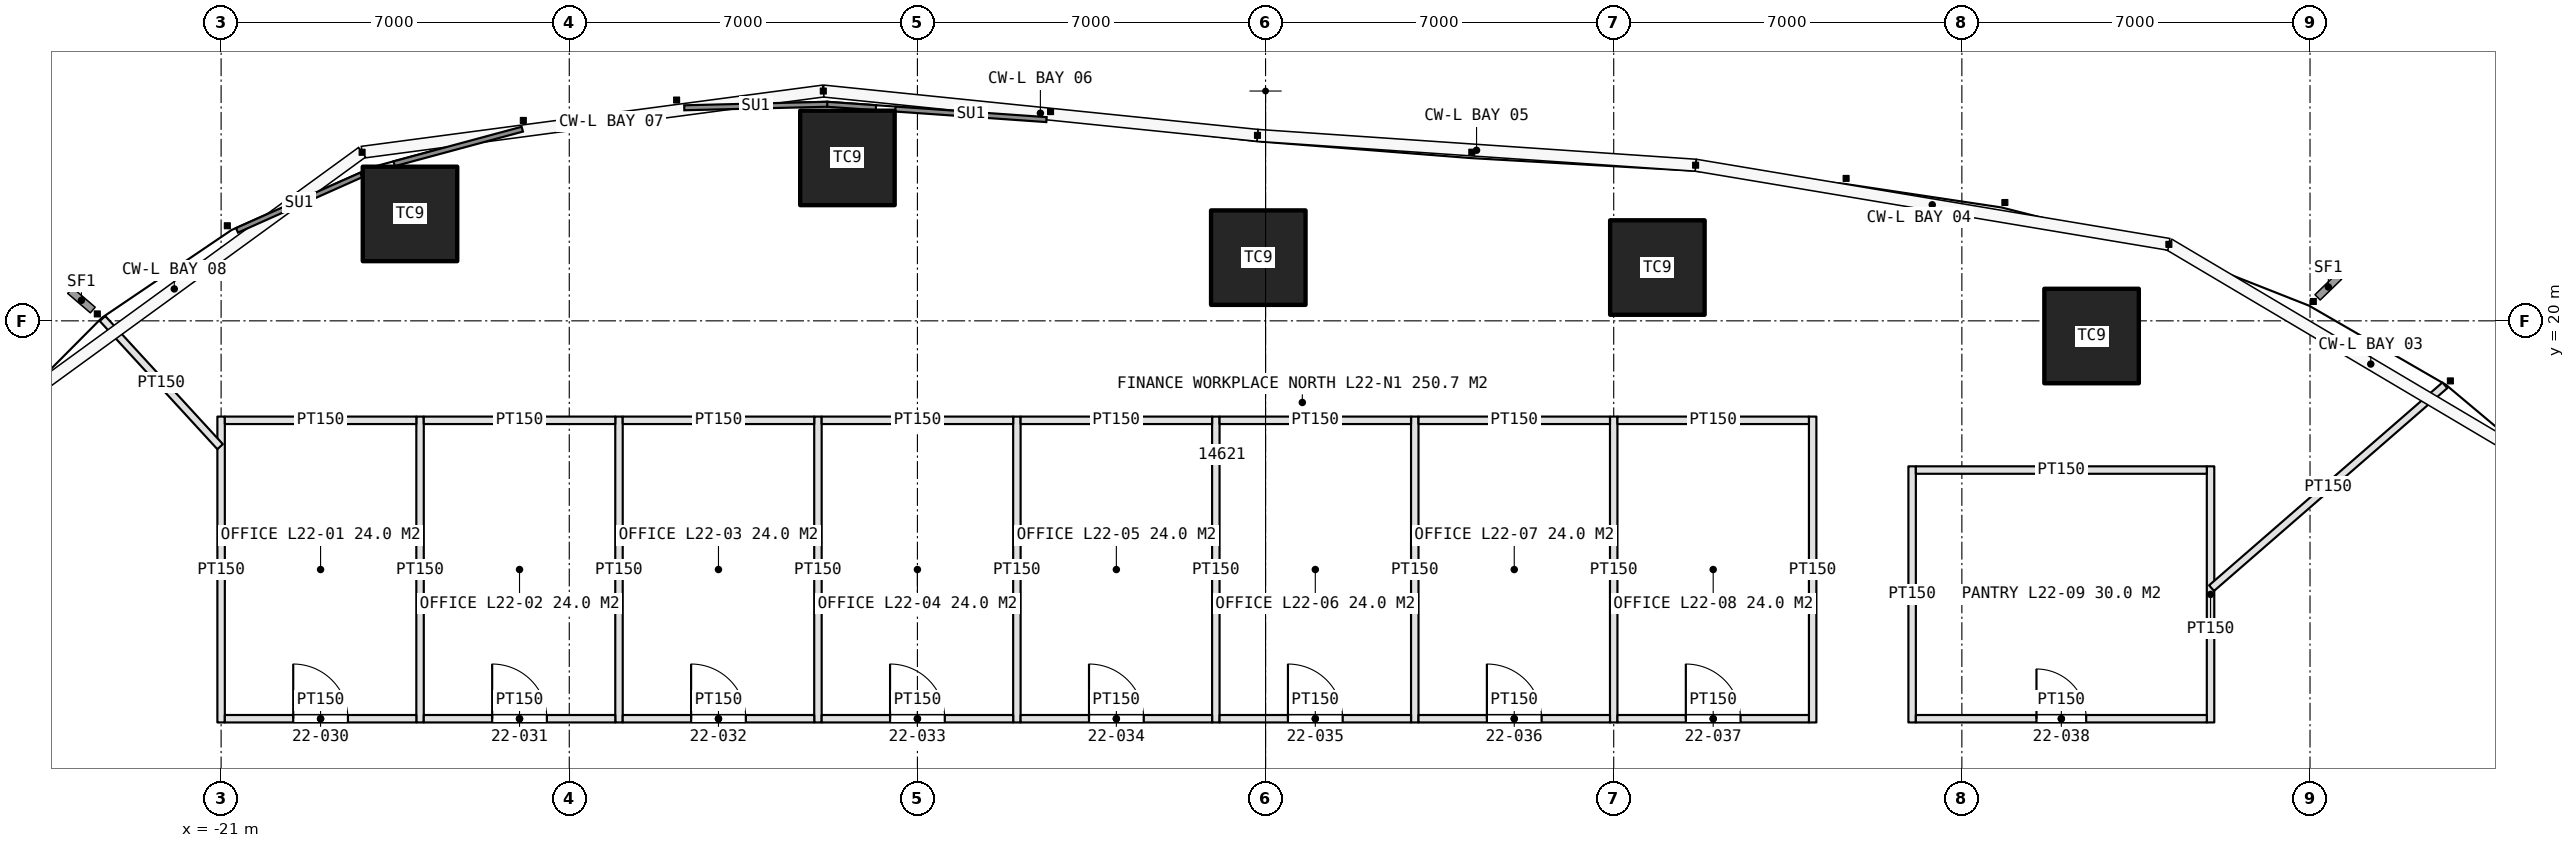
"""IFC4 building model, lengths in metres.
Left out: names, types, materials, properties, quantities, classifications, styles, units other than length and angle.
Written with IfcOpenShell. Run it as: python <this file> out.ifc"""

import sys

from ifc_helpers import new_model, si_unit, direction, frame, frame_2d, origin, origin_2d, place, context, subcontext, project, spatial, rectangle, extrude, element, fill, save


model = new_model("IFC4")
c1 = context("Model", 3, precision=1e-05, world=origin(), true_north=direction((0.0, 1.0)))
c2 = subcontext(c1, "Body", "Model", "MODEL_VIEW")
j1 = project(units=[si_unit("LENGTHUNIT", "METRE"), si_unit("PLANEANGLEUNIT", "RADIAN")], contexts=[c1])
p1 = place(None, origin())
s1 = spatial("IfcSite", under=j1, at=p1, CompositionType="ELEMENT")
p2 = place(p1, origin())
s2 = spatial("IfcBuilding", under=s1, at=p2, CompositionType="ELEMENT")
p3 = place(p2, frame((0.0, 0.0, 109.2)))
s3 = spatial("IfcBuildingStorey", under=s2, at=p3, CompositionType="ELEMENT", Elevation=109.2)
for number, where, z_axis, x_axis in (
    (1, (16.608, 19.695, 0.0), (0.0, 0.0, 1.0), (1.0, 0.0, 0.0)),
    (2, (7.878, 21.072, 0.0), (0.0, 0.0, 1.0), (1.0, 0.0, 0.0)),
    (3, (-0.146, 21.271, 0.0), (0.0, 0.0, 1.0), (1.0, 0.0, 0.0)),
    (4, (-8.407, 23.276, 0.0), (0.0, 0.0, 1.0), (1.0, 0.0, 0.0)),
    (5, (-17.202, 22.15, 0.0), (0.0, 0.0, 1.0), (1.0, 0.0, 0.0)),
):
    element("IfcColumn", number, at=place(p3, frame(where, z_axis=z_axis, x_axis=x_axis)), inside=s3, PredefinedType="COLUMN", context=c2, shape_type="SweptSolid", body=[
        extrude(rectangle(XDim=1.9, YDim=1.9, at=origin_2d()), origin(), (0.0, 0.0, 1.0), 4.2),
    ])
for number, where, z_axis, x_axis in (
    (6, (-21.0, 11.925, 0.0), (0.0, 0.0, 1.0), (0.0, 1.0, 0.0)),
    (7, (-17.0, 11.925, 0.0), (0.0, 0.0, 1.0), (0.0, 1.0, 0.0)),
    (8, (-13.0, 11.925, 0.0), (0.0, 0.0, 1.0), (0.0, 1.0, 0.0)),
    (9, (-9.0, 11.925, 0.0), (0.0, 0.0, 1.0), (0.0, 1.0, 0.0)),
    (10, (-5.0, 11.925, 0.0), (0.0, 0.0, 1.0), (0.0, 1.0, 0.0)),
    (11, (-1.0, 11.925, 0.0), (0.0, 0.0, 1.0), (0.0, 1.0, 0.0)),
    (12, (3.0, 11.925, 0.0), (0.0, 0.0, 1.0), (0.0, 1.0, 0.0)),
    (13, (7.0, 11.925, 0.0), (0.0, 0.0, 1.0), (0.0, 1.0, 0.0)),
    (14, (11.0, 11.925, 0.0), (0.0, 0.0, 1.0), (0.0, 1.0, 0.0)),
):
    element("IfcWall", number, at=place(p3, frame(where, z_axis=z_axis, x_axis=x_axis)), inside=s3, PredefinedType="PARTITIONING", context=c2, shape_type="SweptSolid", body=[
        extrude(rectangle(XDim=6.15, YDim=0.15, at=frame_2d((3.075, 0.0))), origin(), (0.0, 0.0, 1.0), 3.0),
    ])
p4 = place(p3, frame((-20.925, 12.0, 0.0), z_axis=(0.0, 0.0, 1.0), x_axis=(1.0, 0.0, 0.0)))
e15 = element("IfcWall", 15, at=p4, inside=s3, PredefinedType="PARTITIONING", context=c2, shape_type="SweptSolid", body=[
    extrude(rectangle(XDim=3.85, YDim=0.15, at=frame_2d((1.925, 0.0))), origin(), (0.0, 0.0, 1.0), 3.0),
])
p5 = place(p4, frame((1.375, 0.0, 0.0)))
e16 = element("IfcOpeningElement", 16, at=p5, cuts=e15, PredefinedType="OPENING", context=c2, shape_type="SweptSolid", body=[
    extrude(rectangle(XDim=1.1, YDim=2.3, at=frame_2d((0.55, 1.15))), frame((0.0, 0.085, 0.0), z_axis=(0.0, -1.0, 0.0), x_axis=(1.0, 0.0, 0.0)), (0.0, 0.0, 1.0), 0.17),
])
p6 = place(p3, frame((-20.925, 18.0, 0.0), z_axis=(0.0, 0.0, 1.0), x_axis=(1.0, 0.0, 0.0)))
e17 = element("IfcWall", 17, at=p6, inside=s3, PredefinedType="PARTITIONING", context=c2, shape_type="SweptSolid", body=[
    extrude(rectangle(XDim=3.85, YDim=0.15, at=frame_2d((1.925, 0.0))), origin(), (0.0, 0.0, 1.0), 3.0),
])
p7 = place(p3, frame((-16.925, 12.0, 0.0), z_axis=(0.0, 0.0, 1.0), x_axis=(1.0, 0.0, 0.0)))
e18 = element("IfcWall", 18, at=p7, inside=s3, PredefinedType="PARTITIONING", context=c2, shape_type="SweptSolid", body=[
    extrude(rectangle(XDim=3.85, YDim=0.15, at=frame_2d((1.925, 0.0))), origin(), (0.0, 0.0, 1.0), 3.0),
])
p8 = place(p7, frame((1.375, 0.0, 0.0)))
e19 = element("IfcOpeningElement", 19, at=p8, cuts=e18, PredefinedType="OPENING", context=c2, shape_type="SweptSolid", body=[
    extrude(rectangle(XDim=1.1, YDim=2.3, at=frame_2d((0.55, 1.15))), frame((0.0, 0.085, 0.0), z_axis=(0.0, -1.0, 0.0), x_axis=(1.0, 0.0, 0.0)), (0.0, 0.0, 1.0), 0.17),
])
p9 = place(p3, frame((-16.925, 18.0, 0.0), z_axis=(0.0, 0.0, 1.0), x_axis=(1.0, 0.0, 0.0)))
e20 = element("IfcWall", 20, at=p9, inside=s3, PredefinedType="PARTITIONING", context=c2, shape_type="SweptSolid", body=[
    extrude(rectangle(XDim=3.85, YDim=0.15, at=frame_2d((1.925, 0.0))), origin(), (0.0, 0.0, 1.0), 3.0),
])
p10 = place(p3, frame((-12.925, 12.0, 0.0), z_axis=(0.0, 0.0, 1.0), x_axis=(1.0, 0.0, 0.0)))
e21 = element("IfcWall", 21, at=p10, inside=s3, PredefinedType="PARTITIONING", context=c2, shape_type="SweptSolid", body=[
    extrude(rectangle(XDim=3.85, YDim=0.15, at=frame_2d((1.925, 0.0))), origin(), (0.0, 0.0, 1.0), 3.0),
])
p11 = place(p10, frame((1.375, 0.0, 0.0)))
e22 = element("IfcOpeningElement", 22, at=p11, cuts=e21, PredefinedType="OPENING", context=c2, shape_type="SweptSolid", body=[
    extrude(rectangle(XDim=1.1, YDim=2.3, at=frame_2d((0.55, 1.15))), frame((0.0, 0.085, 0.0), z_axis=(0.0, -1.0, 0.0), x_axis=(1.0, 0.0, 0.0)), (0.0, 0.0, 1.0), 0.17),
])
p12 = place(p3, frame((-12.925, 18.0, 0.0), z_axis=(0.0, 0.0, 1.0), x_axis=(1.0, 0.0, 0.0)))
e23 = element("IfcWall", 23, at=p12, inside=s3, PredefinedType="PARTITIONING", context=c2, shape_type="SweptSolid", body=[
    extrude(rectangle(XDim=3.85, YDim=0.15, at=frame_2d((1.925, 0.0))), origin(), (0.0, 0.0, 1.0), 3.0),
])
p13 = place(p3, frame((-8.925, 12.0, 0.0), z_axis=(0.0, 0.0, 1.0), x_axis=(1.0, 0.0, 0.0)))
e24 = element("IfcWall", 24, at=p13, inside=s3, PredefinedType="PARTITIONING", context=c2, shape_type="SweptSolid", body=[
    extrude(rectangle(XDim=3.85, YDim=0.15, at=frame_2d((1.925, 0.0))), origin(), (0.0, 0.0, 1.0), 3.0),
])
p14 = place(p13, frame((1.375, 0.0, 0.0)))
e25 = element("IfcOpeningElement", 25, at=p14, cuts=e24, PredefinedType="OPENING", context=c2, shape_type="SweptSolid", body=[
    extrude(rectangle(XDim=1.1, YDim=2.3, at=frame_2d((0.55, 1.15))), frame((0.0, 0.085, 0.0), z_axis=(0.0, -1.0, 0.0), x_axis=(1.0, 0.0, 0.0)), (0.0, 0.0, 1.0), 0.17),
])
p15 = place(p3, frame((-8.925, 18.0, 0.0), z_axis=(0.0, 0.0, 1.0), x_axis=(1.0, 0.0, 0.0)))
e26 = element("IfcWall", 26, at=p15, inside=s3, PredefinedType="PARTITIONING", context=c2, shape_type="SweptSolid", body=[
    extrude(rectangle(XDim=3.85, YDim=0.15, at=frame_2d((1.925, 0.0))), origin(), (0.0, 0.0, 1.0), 3.0),
])
p16 = place(p3, frame((-4.925, 12.0, 0.0), z_axis=(0.0, 0.0, 1.0), x_axis=(1.0, 0.0, 0.0)))
e27 = element("IfcWall", 27, at=p16, inside=s3, PredefinedType="PARTITIONING", context=c2, shape_type="SweptSolid", body=[
    extrude(rectangle(XDim=3.85, YDim=0.15, at=frame_2d((1.925, 0.0))), origin(), (0.0, 0.0, 1.0), 3.0),
])
p17 = place(p16, frame((1.375, 0.0, 0.0)))
e28 = element("IfcOpeningElement", 28, at=p17, cuts=e27, PredefinedType="OPENING", context=c2, shape_type="SweptSolid", body=[
    extrude(rectangle(XDim=1.1, YDim=2.3, at=frame_2d((0.55, 1.15))), frame((0.0, 0.085, 0.0), z_axis=(0.0, -1.0, 0.0), x_axis=(1.0, 0.0, 0.0)), (0.0, 0.0, 1.0), 0.17),
])
p18 = place(p3, frame((-4.925, 18.0, 0.0), z_axis=(0.0, 0.0, 1.0), x_axis=(1.0, 0.0, 0.0)))
e29 = element("IfcWall", 29, at=p18, inside=s3, PredefinedType="PARTITIONING", context=c2, shape_type="SweptSolid", body=[
    extrude(rectangle(XDim=3.85, YDim=0.15, at=frame_2d((1.925, 0.0))), origin(), (0.0, 0.0, 1.0), 3.0),
])
p19 = place(p3, frame((-0.925, 12.0, 0.0), z_axis=(0.0, 0.0, 1.0), x_axis=(1.0, 0.0, 0.0)))
e30 = element("IfcWall", 30, at=p19, inside=s3, PredefinedType="PARTITIONING", context=c2, shape_type="SweptSolid", body=[
    extrude(rectangle(XDim=3.85, YDim=0.15, at=frame_2d((1.925, 0.0))), origin(), (0.0, 0.0, 1.0), 3.0),
])
p20 = place(p19, frame((1.375, 0.0, 0.0)))
e31 = element("IfcOpeningElement", 31, at=p20, cuts=e30, PredefinedType="OPENING", context=c2, shape_type="SweptSolid", body=[
    extrude(rectangle(XDim=1.1, YDim=2.3, at=frame_2d((0.55, 1.15))), frame((0.0, 0.085, 0.0), z_axis=(0.0, -1.0, 0.0), x_axis=(1.0, 0.0, 0.0)), (0.0, 0.0, 1.0), 0.17),
])
p21 = place(p3, frame((-0.925, 18.0, 0.0), z_axis=(0.0, 0.0, 1.0), x_axis=(1.0, 0.0, 0.0)))
e32 = element("IfcWall", 32, at=p21, inside=s3, PredefinedType="PARTITIONING", context=c2, shape_type="SweptSolid", body=[
    extrude(rectangle(XDim=3.85, YDim=0.15, at=frame_2d((1.925, 0.0))), origin(), (0.0, 0.0, 1.0), 3.0),
])
p22 = place(p3, frame((3.075, 12.0, 0.0), z_axis=(0.0, 0.0, 1.0), x_axis=(1.0, 0.0, 0.0)))
e33 = element("IfcWall", 33, at=p22, inside=s3, PredefinedType="PARTITIONING", context=c2, shape_type="SweptSolid", body=[
    extrude(rectangle(XDim=3.85, YDim=0.15, at=frame_2d((1.925, 0.0))), origin(), (0.0, 0.0, 1.0), 3.0),
])
p23 = place(p22, frame((1.375, 0.0, 0.0)))
e34 = element("IfcOpeningElement", 34, at=p23, cuts=e33, PredefinedType="OPENING", context=c2, shape_type="SweptSolid", body=[
    extrude(rectangle(XDim=1.1, YDim=2.3, at=frame_2d((0.55, 1.15))), frame((0.0, 0.085, 0.0), z_axis=(0.0, -1.0, 0.0), x_axis=(1.0, 0.0, 0.0)), (0.0, 0.0, 1.0), 0.17),
])
p24 = place(p3, frame((3.075, 18.0, 0.0), z_axis=(0.0, 0.0, 1.0), x_axis=(1.0, 0.0, 0.0)))
e35 = element("IfcWall", 35, at=p24, inside=s3, PredefinedType="PARTITIONING", context=c2, shape_type="SweptSolid", body=[
    extrude(rectangle(XDim=3.85, YDim=0.15, at=frame_2d((1.925, 0.0))), origin(), (0.0, 0.0, 1.0), 3.0),
])
p25 = place(p3, frame((7.075, 12.0, 0.0), z_axis=(0.0, 0.0, 1.0), x_axis=(1.0, 0.0, 0.0)))
e36 = element("IfcWall", 36, at=p25, inside=s3, PredefinedType="PARTITIONING", context=c2, shape_type="SweptSolid", body=[
    extrude(rectangle(XDim=3.85, YDim=0.15, at=frame_2d((1.925, 0.0))), origin(), (0.0, 0.0, 1.0), 3.0),
])
p26 = place(p25, frame((1.375, 0.0, 0.0)))
e37 = element("IfcOpeningElement", 37, at=p26, cuts=e36, PredefinedType="OPENING", context=c2, shape_type="SweptSolid", body=[
    extrude(rectangle(XDim=1.1, YDim=2.3, at=frame_2d((0.55, 1.15))), frame((0.0, 0.085, 0.0), z_axis=(0.0, -1.0, 0.0), x_axis=(1.0, 0.0, 0.0)), (0.0, 0.0, 1.0), 0.17),
])
p27 = place(p3, frame((7.075, 18.0, 0.0), z_axis=(0.0, 0.0, 1.0), x_axis=(1.0, 0.0, 0.0)))
e38 = element("IfcWall", 38, at=p27, inside=s3, PredefinedType="PARTITIONING", context=c2, shape_type="SweptSolid", body=[
    extrude(rectangle(XDim=3.85, YDim=0.15, at=frame_2d((1.925, 0.0))), origin(), (0.0, 0.0, 1.0), 3.0),
])
for number, where, z_axis, x_axis in (
    (39, (13.0, 11.925, 0.0), (0.0, 0.0, 1.0), (0.0, 1.0, 0.0)),
    (40, (19.0, 11.925, 0.0), (0.0, 0.0, 1.0), (0.0, 1.0, 0.0)),
):
    element("IfcWall", number, at=place(p3, frame(where, z_axis=z_axis, x_axis=x_axis)), inside=s3, PredefinedType="PARTITIONING", context=c2, shape_type="SweptSolid", body=[
        extrude(rectangle(XDim=5.15, YDim=0.15, at=frame_2d((2.575, 0.0))), origin(), (0.0, 0.0, 1.0), 3.0),
    ])
p28 = place(p3, frame((13.075, 12.0, 0.0), z_axis=(0.0, 0.0, 1.0), x_axis=(1.0, 0.0, 0.0)))
e41 = element("IfcWall", 41, at=p28, inside=s3, PredefinedType="PARTITIONING", context=c2, shape_type="SweptSolid", body=[
    extrude(rectangle(XDim=5.85, YDim=0.15, at=frame_2d((2.925, 0.0))), origin(), (0.0, 0.0, 1.0), 3.0),
])
p29 = place(p28, frame((2.425, 0.0, 0.0)))
e42 = element("IfcOpeningElement", 42, at=p29, cuts=e41, PredefinedType="OPENING", context=c2, shape_type="SweptSolid", body=[
    extrude(rectangle(XDim=1.0, YDim=2.2, at=frame_2d((0.5, 1.1))), frame((0.0, 0.085, 0.0), z_axis=(0.0, -1.0, 0.0), x_axis=(1.0, 0.0, 0.0)), (0.0, 0.0, 1.0), 0.17),
])
p30 = place(p3, frame((13.075, 17.0, 0.0), z_axis=(0.0, 0.0, 1.0), x_axis=(1.0, 0.0, 0.0)))
e43 = element("IfcWall", 43, at=p30, inside=s3, PredefinedType="PARTITIONING", context=c2, shape_type="SweptSolid", body=[
    extrude(rectangle(XDim=5.85, YDim=0.15, at=frame_2d((2.925, 0.0))), origin(), (0.0, 0.0, 1.0), 3.0),
])
p31 = place(p3, frame((-21.02, 17.47, 0.0), z_axis=(0.0, 0.0, 1.0), x_axis=(-0.67615762792, 0.736756989927, 0.0)))
e44 = element("IfcWall", 44, at=p31, inside=s3, PredefinedType="PARTITIONING", context=c2, shape_type="SweptSolid", body=[
    extrude(rectangle(XDim=3.497, YDim=0.15, at=frame_2d((1.749, 0.0))), origin(), (0.0, 0.0, 1.0), 3.0),
])
p32 = place(p3, frame((19.02, 14.625, 0.0), z_axis=(0.0, 0.0, 1.0), x_axis=(0.754691753605, 0.656079535605, 0.0)))
e45 = element("IfcWall", 45, at=p32, inside=s3, PredefinedType="PARTITIONING", context=c2, shape_type="SweptSolid", body=[
    extrude(rectangle(XDim=6.217, YDim=0.15, at=frame_2d((3.108, 0.0))), origin(), (0.0, 0.0, 1.0), 3.0),
])
p33 = place(p5, origin())
e46 = element("IfcDoor", 46, at=p33, inside=s3, OperationType="SINGLE_SWING_LEFT", PredefinedType="DOOR", context=c2, shape_type="SweptSolid", body=[
    extrude(rectangle(XDim=1.1, YDim=2.3, at=frame_2d((0.55, 1.15))), frame((0.0, 0.025, 0.0), z_axis=(0.0, -1.0, 0.0), x_axis=(1.0, 0.0, 0.0)), (0.0, 0.0, 1.0), 0.05),
])
fill(e16, e46)
p34 = place(p8, origin())
e47 = element("IfcDoor", 47, at=p34, inside=s3, OperationType="SINGLE_SWING_LEFT", PredefinedType="DOOR", context=c2, shape_type="SweptSolid", body=[
    extrude(rectangle(XDim=1.1, YDim=2.3, at=frame_2d((0.55, 1.15))), frame((0.0, 0.025, 0.0), z_axis=(0.0, -1.0, 0.0), x_axis=(1.0, 0.0, 0.0)), (0.0, 0.0, 1.0), 0.05),
])
fill(e19, e47)
p35 = place(p11, origin())
e48 = element("IfcDoor", 48, at=p35, inside=s3, OperationType="SINGLE_SWING_LEFT", PredefinedType="DOOR", context=c2, shape_type="SweptSolid", body=[
    extrude(rectangle(XDim=1.1, YDim=2.3, at=frame_2d((0.55, 1.15))), frame((0.0, 0.025, 0.0), z_axis=(0.0, -1.0, 0.0), x_axis=(1.0, 0.0, 0.0)), (0.0, 0.0, 1.0), 0.05),
])
fill(e22, e48)
p36 = place(p14, origin())
e49 = element("IfcDoor", 49, at=p36, inside=s3, OperationType="SINGLE_SWING_LEFT", PredefinedType="DOOR", context=c2, shape_type="SweptSolid", body=[
    extrude(rectangle(XDim=1.1, YDim=2.3, at=frame_2d((0.55, 1.15))), frame((0.0, 0.025, 0.0), z_axis=(0.0, -1.0, 0.0), x_axis=(1.0, 0.0, 0.0)), (0.0, 0.0, 1.0), 0.05),
])
fill(e25, e49)
p37 = place(p17, origin())
e50 = element("IfcDoor", 50, at=p37, inside=s3, OperationType="SINGLE_SWING_LEFT", PredefinedType="DOOR", context=c2, shape_type="SweptSolid", body=[
    extrude(rectangle(XDim=1.1, YDim=2.3, at=frame_2d((0.55, 1.15))), frame((0.0, 0.025, 0.0), z_axis=(0.0, -1.0, 0.0), x_axis=(1.0, 0.0, 0.0)), (0.0, 0.0, 1.0), 0.05),
])
fill(e28, e50)
p38 = place(p20, origin())
e51 = element("IfcDoor", 51, at=p38, inside=s3, OperationType="SINGLE_SWING_LEFT", PredefinedType="DOOR", context=c2, shape_type="SweptSolid", body=[
    extrude(rectangle(XDim=1.1, YDim=2.3, at=frame_2d((0.55, 1.15))), frame((0.0, 0.025, 0.0), z_axis=(0.0, -1.0, 0.0), x_axis=(1.0, 0.0, 0.0)), (0.0, 0.0, 1.0), 0.05),
])
fill(e31, e51)
p39 = place(p23, origin())
e52 = element("IfcDoor", 52, at=p39, inside=s3, OperationType="SINGLE_SWING_LEFT", PredefinedType="DOOR", context=c2, shape_type="SweptSolid", body=[
    extrude(rectangle(XDim=1.1, YDim=2.3, at=frame_2d((0.55, 1.15))), frame((0.0, 0.025, 0.0), z_axis=(0.0, -1.0, 0.0), x_axis=(1.0, 0.0, 0.0)), (0.0, 0.0, 1.0), 0.05),
])
fill(e34, e52)
p40 = place(p26, origin())
e53 = element("IfcDoor", 53, at=p40, inside=s3, OperationType="SINGLE_SWING_LEFT", PredefinedType="DOOR", context=c2, shape_type="SweptSolid", body=[
    extrude(rectangle(XDim=1.1, YDim=2.3, at=frame_2d((0.55, 1.15))), frame((0.0, 0.025, 0.0), z_axis=(0.0, -1.0, 0.0), x_axis=(1.0, 0.0, 0.0)), (0.0, 0.0, 1.0), 0.05),
])
fill(e37, e53)
p41 = place(p29, origin())
e54 = element("IfcDoor", 54, at=p41, inside=s3, OperationType="SINGLE_SWING_LEFT", PredefinedType="DOOR", context=c2, shape_type="SweptSolid", body=[
    extrude(rectangle(XDim=1.0, YDim=2.2, at=frame_2d((0.5, 1.1))), frame((0.0, 0.025, 0.0), z_axis=(0.0, -1.0, 0.0), x_axis=(1.0, 0.0, 0.0)), (0.0, 0.0, 1.0), 0.05),
])
fill(e42, e54)
save(model, sys.argv[1])
